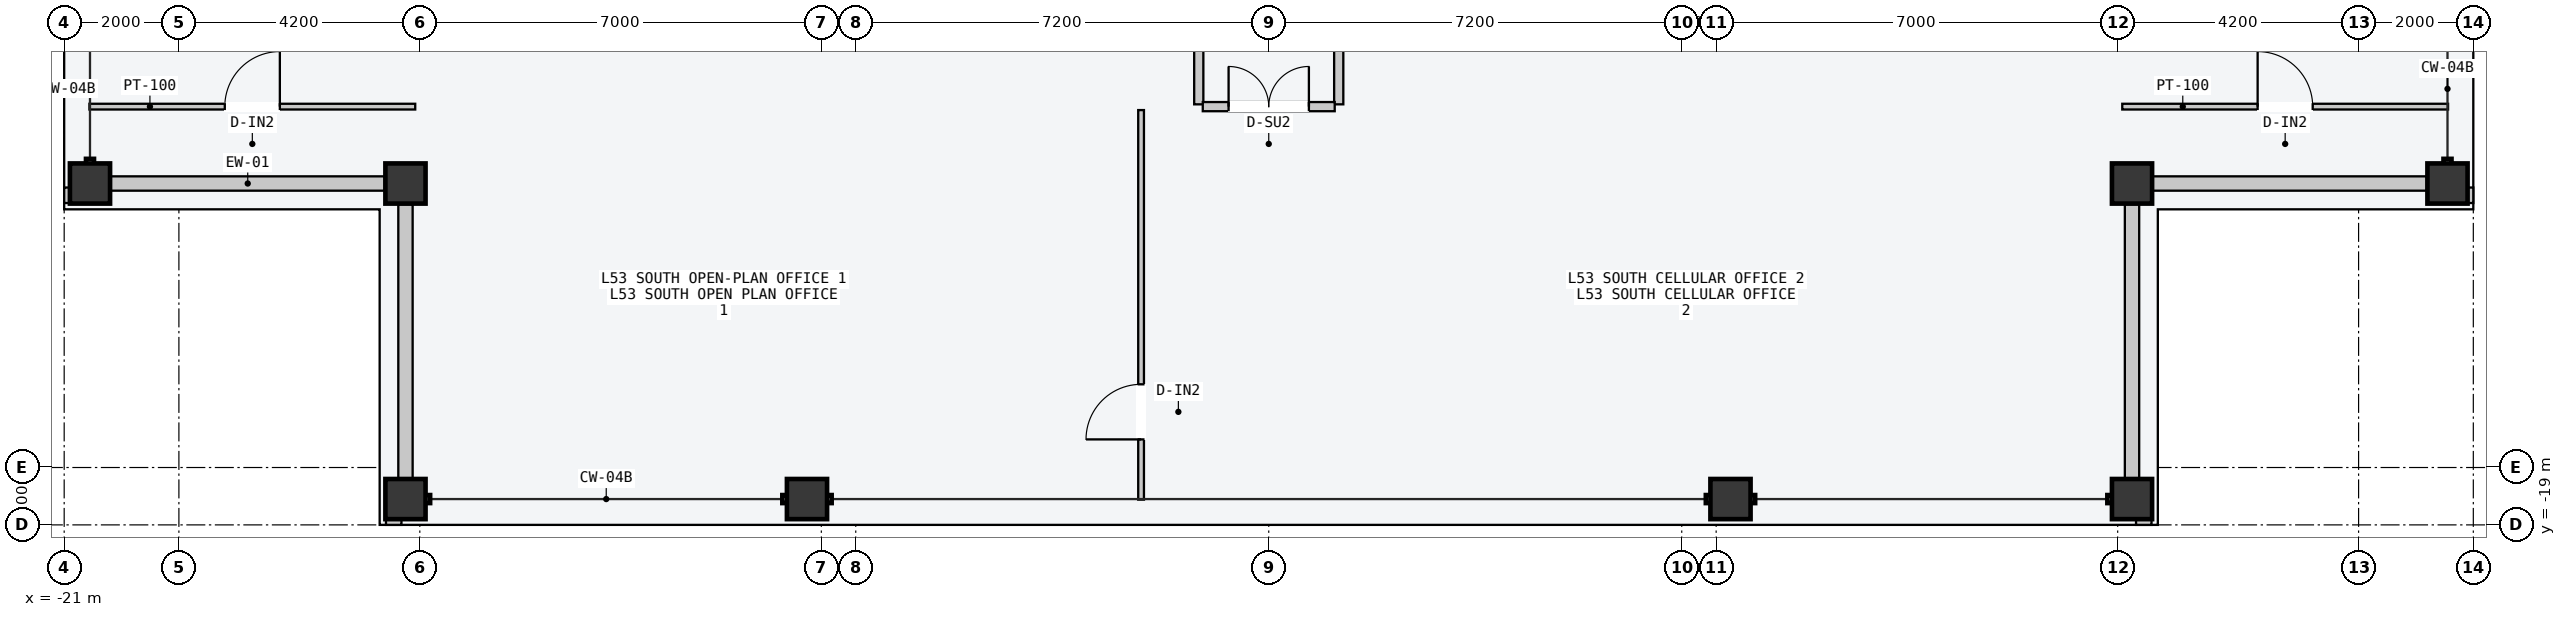
"""IFC4 building model, lengths in metres.
Left out: names, types, materials, properties, quantities, classifications, styles, units other than length and angle.
Written with IfcOpenShell. Run it as: python <this file> out.ifc"""

import sys

from ifc_helpers import new_model, si_unit, direction, frame, frame_2d, origin, origin_2d, place, context, subcontext, project, spatial, rectangle, hollow_rectangle, extrude, element, fill, save


model = new_model("IFC4")
c1 = context("Model", 3, precision=1e-05, world=origin(), true_north=direction((0.0, 1.0)))
c2 = subcontext(c1, "Body", "Model", "MODEL_VIEW")
j1 = project(units=[si_unit("LENGTHUNIT", "METRE"), si_unit("PLANEANGLEUNIT", "RADIAN")], contexts=[c1])
p1 = place(None, origin())
s1 = spatial("IfcSite", under=j1, at=p1, CompositionType="ELEMENT")
p2 = place(p1, origin())
s2 = spatial("IfcBuilding", under=s1, at=p2, CompositionType="ELEMENT")
p3 = place(p2, frame((0.0, 0.0, 201.9)))
s3 = spatial("IfcBuildingStorey", under=s2, at=p3, CompositionType="ELEMENT", Elevation=201.9)
for number, where, z_axis, x_axis in (
    (1, (-15.05, -18.55, 0.0), (0.0, 0.0, 1.0), (1.0, 0.0, 0.0)),
    (2, (-8.05, -18.55, 0.0), (0.0, 0.0, 1.0), (1.0, 0.0, 0.0)),
    (3, (8.05, -18.55, 0.0), (0.0, 0.0, 1.0), (1.0, 0.0, 0.0)),
    (4, (15.05, -18.55, 0.0), (0.0, 0.0, 1.0), (1.0, 0.0, 0.0)),
    (5, (-20.55, -13.05, 0.0), (0.0, 0.0, 1.0), (0.0, 1.0, 0.0)),
    (6, (20.55, -13.05, 0.0), (0.0, 0.0, 1.0), (0.0, 1.0, 0.0)),
    (7, (15.05, -13.05, 0.0), (0.0, 0.0, 1.0), (1.0, 0.0, 0.0)),
    (8, (-15.05, -13.05, 0.0), (0.0, 0.0, 1.0), (1.0, 0.0, 0.0)),
):
    element("IfcColumn", number, at=place(p3, frame(where, z_axis=z_axis, x_axis=x_axis)), inside=s3, PredefinedType="COLUMN", context=c2, shape_type="SweptSolid", body=[
        extrude(hollow_rectangle(XDim=0.7, YDim=0.7, WallThickness=0.03, at=origin_2d()), origin(), (0.0, 0.0, 1.0), 3.6),
    ])
for number, where, z_axis, x_axis in (
    (9, (-20.19, -13.05, 0.0), (0.0, 0.0, 1.0), (1.0, 0.0, 0.0)),
    (10, (-15.05, -18.19, 0.0), (0.0, 0.0, 1.0), (0.0, 1.0, 0.0)),
    (11, (15.41, -13.05, 0.0), (0.0, 0.0, 1.0), (1.0, 0.0, 0.0)),
    (12, (15.05, -18.19, 0.0), (0.0, 0.0, 1.0), (0.0, 1.0, 0.0)),
):
    element("IfcWall", number, at=place(p3, frame(where, z_axis=z_axis, x_axis=x_axis)), inside=s3, PredefinedType="STANDARD", context=c2, shape_type="SweptSolid", body=[
        extrude(rectangle(XDim=4.78, YDim=0.25, at=frame_2d((2.39, 0.0))), origin(), (0.0, 0.0, 1.0), 2.75),
    ])
for number, where, z_axis, x_axis in (
    (13, (-15.39, -18.89, 0.0), (0.0, 0.0, 1.0), (1.0, 0.0, 0.0)),
    (14, (-20.89, -13.39, 0.0), (0.0, 0.0, 1.0), (0.0, 1.0, 0.0)),
    (15, (15.12, -18.89, 0.0), (0.0, 0.0, 1.0), (1.0, 0.0, 0.0)),
    (16, (20.89, -13.39, 0.0), (0.0, 0.0, 1.0), (0.0, 1.0, 0.0)),
):
    element("IfcWall", number, at=place(p3, frame(where, z_axis=z_axis, x_axis=x_axis)), inside=s3, PredefinedType="PARAPET", context=c2, shape_type="SweptSolid", body=[
        extrude(rectangle(XDim=0.27, YDim=0.22, at=frame_2d((0.135, 0.0))), origin(), (0.0, 0.0, 1.0), 1.2),
    ])
p4 = place(p3, frame((-1.22, -11.67, 0.0), z_axis=(0.0, 0.0, 1.0), x_axis=(0.0, 1.0, 0.0)))
e17 = element("IfcWall", 17, at=p4, inside=s3, PredefinedType="PARTITIONING", context=c2, shape_type="SweptSolid", body=[
    extrude(rectangle(XDim=5.99, YDim=0.16, at=frame_2d((2.995, 0.0))), origin(), (0.0, 0.0, 1.0), 3.4),
])
p5 = place(p4, frame((1.15, 0.0, 0.0)))
e18 = element("IfcOpeningElement", 18, at=p5, cuts=e17, PredefinedType="OPENING", context=c2, shape_type="SweptSolid", body=[
    extrude(rectangle(XDim=0.96, YDim=2.18, at=frame_2d((0.48, 1.09))), frame((0.0, 0.09, 0.0), z_axis=(0.0, -1.0, 0.0), x_axis=(1.0, 0.0, 0.0)), (0.0, 0.0, 1.0), 0.18),
])
p6 = place(p3, frame((1.22, -11.67, 0.0), z_axis=(0.0, 0.0, 1.0), x_axis=(0.0, 1.0, 0.0)))
e19 = element("IfcWall", 19, at=p6, inside=s3, PredefinedType="PARTITIONING", context=c2, shape_type="SweptSolid", body=[
    extrude(rectangle(XDim=5.99, YDim=0.16, at=frame_2d((2.995, 0.0))), origin(), (0.0, 0.0, 1.0), 3.4),
])
p7 = place(p6, frame((1.15, 0.0, 0.0)))
e20 = element("IfcOpeningElement", 20, at=p7, cuts=e19, PredefinedType="OPENING", context=c2, shape_type="SweptSolid", body=[
    extrude(rectangle(XDim=0.96, YDim=2.18, at=frame_2d((0.48, 1.09))), frame((0.0, 0.09, 0.0), z_axis=(0.0, -1.0, 0.0), x_axis=(1.0, 0.0, 0.0)), (0.0, 0.0, 1.0), 0.18),
])
p8 = place(p3, frame((-2.226, -18.56, 0.0), z_axis=(0.0, 0.0, 1.0), x_axis=(0.0, 1.0, 0.0)))
e21 = element("IfcWall", 21, at=p8, inside=s3, PredefinedType="PARTITIONING", context=c2, shape_type="SweptSolid", body=[
    extrude(rectangle(XDim=6.79, YDim=0.1, at=frame_2d((3.395, 0.0))), origin(), (0.0, 0.0, 1.0), 3.4),
])
p9 = place(p8, frame((1.05, 0.0, 0.0)))
e22 = element("IfcOpeningElement", 22, at=p9, cuts=e21, PredefinedType="OPENING", context=c2, shape_type="SweptSolid", body=[
    extrude(rectangle(XDim=0.96, YDim=2.18, at=frame_2d((0.48, 1.09))), frame((0.0, 0.06, 0.0), z_axis=(0.0, -1.0, 0.0), x_axis=(1.0, 0.0, 0.0)), (0.0, 0.0, 1.0), 0.12),
])
p10 = place(p3, frame((-1.15, -11.71, 0.0), z_axis=(0.0, 0.0, 1.0), x_axis=(1.0, 0.0, 0.0)))
e23 = element("IfcWall", 23, at=p10, inside=s3, PredefinedType="PARTITIONING", context=c2, shape_type="SweptSolid", body=[
    extrude(rectangle(XDim=2.3, YDim=0.16, at=frame_2d((1.15, 0.0))), origin(), (0.0, 0.0, 1.0), 3.4),
])
p11 = place(p10, frame((0.45, 0.0, 0.0)))
e24 = element("IfcOpeningElement", 24, at=p11, cuts=e23, PredefinedType="OPENING", context=c2, shape_type="SweptSolid", body=[
    extrude(rectangle(XDim=1.4, YDim=2.2, at=frame_2d((0.7, 1.1))), frame((0.0, 0.09, 0.0), z_axis=(0.0, -1.0, 0.0), x_axis=(1.0, 0.0, 0.0)), (0.0, 0.0, 1.0), 0.18),
])
p12 = place(p3, frame((-20.56, -11.71, 0.0), z_axis=(0.0, 0.0, 1.0), x_axis=(1.0, 0.0, 0.0)))
e25 = element("IfcWall", 25, at=p12, inside=s3, PredefinedType="PARTITIONING", context=c2, shape_type="SweptSolid", body=[
    extrude(rectangle(XDim=5.68, YDim=0.1, at=frame_2d((2.84, 0.0))), origin(), (0.0, 0.0, 1.0), 3.4),
])
p13 = place(p12, frame((2.36, 0.0, 0.0)))
e26 = element("IfcOpeningElement", 26, at=p13, cuts=e25, PredefinedType="OPENING", context=c2, shape_type="SweptSolid", body=[
    extrude(rectangle(XDim=0.96, YDim=2.18, at=frame_2d((0.48, 1.09))), frame((0.0, 0.06, 0.0), z_axis=(0.0, -1.0, 0.0), x_axis=(1.0, 0.0, 0.0)), (0.0, 0.0, 1.0), 0.12),
])
p14 = place(p3, frame((14.88, -11.71, 0.0), z_axis=(0.0, 0.0, 1.0), x_axis=(1.0, 0.0, 0.0)))
e27 = element("IfcWall", 27, at=p14, inside=s3, PredefinedType="PARTITIONING", context=c2, shape_type="SweptSolid", body=[
    extrude(rectangle(XDim=5.68, YDim=0.1, at=frame_2d((2.84, 0.0))), origin(), (0.0, 0.0, 1.0), 3.4),
])
p15 = place(p14, frame((2.36, 0.0, 0.0)))
e28 = element("IfcOpeningElement", 28, at=p15, cuts=e27, PredefinedType="OPENING", context=c2, shape_type="SweptSolid", body=[
    extrude(rectangle(XDim=0.96, YDim=2.18, at=frame_2d((0.48, 1.09))), frame((0.0, 0.06, 0.0), z_axis=(0.0, -1.0, 0.0), x_axis=(1.0, 0.0, 0.0)), (0.0, 0.0, 1.0), 0.12),
])
p16 = place(p9, origin())
e29 = element("IfcDoor", 29, at=p16, inside=s3, OperationType="SINGLE_SWING_LEFT", PredefinedType="DOOR", context=c2, shape_type="SweptSolid", body=[
    extrude(rectangle(XDim=0.96, YDim=2.18, at=frame_2d((0.48, 1.09))), frame((0.0, 0.025, 0.0), z_axis=(0.0, -1.0, 0.0), x_axis=(1.0, 0.0, 0.0)), (0.0, 0.0, 1.0), 0.05),
])
fill(e22, e29)
p17 = place(p11, origin())
e30 = element("IfcDoor", 30, at=p17, inside=s3, OperationType="DOUBLE_DOOR_SINGLE_SWING", PredefinedType="DOOR", context=c2, shape_type="SweptSolid", body=[
    extrude(rectangle(XDim=1.4, YDim=2.2, at=frame_2d((0.7, 1.1))), frame((0.0, 0.025, 0.0), z_axis=(0.0, -1.0, 0.0), x_axis=(1.0, 0.0, 0.0)), (0.0, 0.0, 1.0), 0.05),
])
fill(e24, e30)
p18 = place(p13, origin())
e31 = element("IfcDoor", 31, at=p18, inside=s3, OperationType="SINGLE_SWING_RIGHT", PredefinedType="DOOR", context=c2, shape_type="SweptSolid", body=[
    extrude(rectangle(XDim=0.96, YDim=2.18, at=frame_2d((0.48, 1.09))), frame((0.0, 0.025, 0.0), z_axis=(0.0, -1.0, 0.0), x_axis=(1.0, 0.0, 0.0)), (0.0, 0.0, 1.0), 0.05),
])
fill(e26, e31)
p19 = place(p15, origin())
e32 = element("IfcDoor", 32, at=p19, inside=s3, OperationType="SINGLE_SWING_LEFT", PredefinedType="DOOR", context=c2, shape_type="SweptSolid", body=[
    extrude(rectangle(XDim=0.96, YDim=2.18, at=frame_2d((0.48, 1.09))), frame((0.0, 0.025, 0.0), z_axis=(0.0, -1.0, 0.0), x_axis=(1.0, 0.0, 0.0)), (0.0, 0.0, 1.0), 0.05),
])
fill(e28, e32)
save(model, sys.argv[1])
